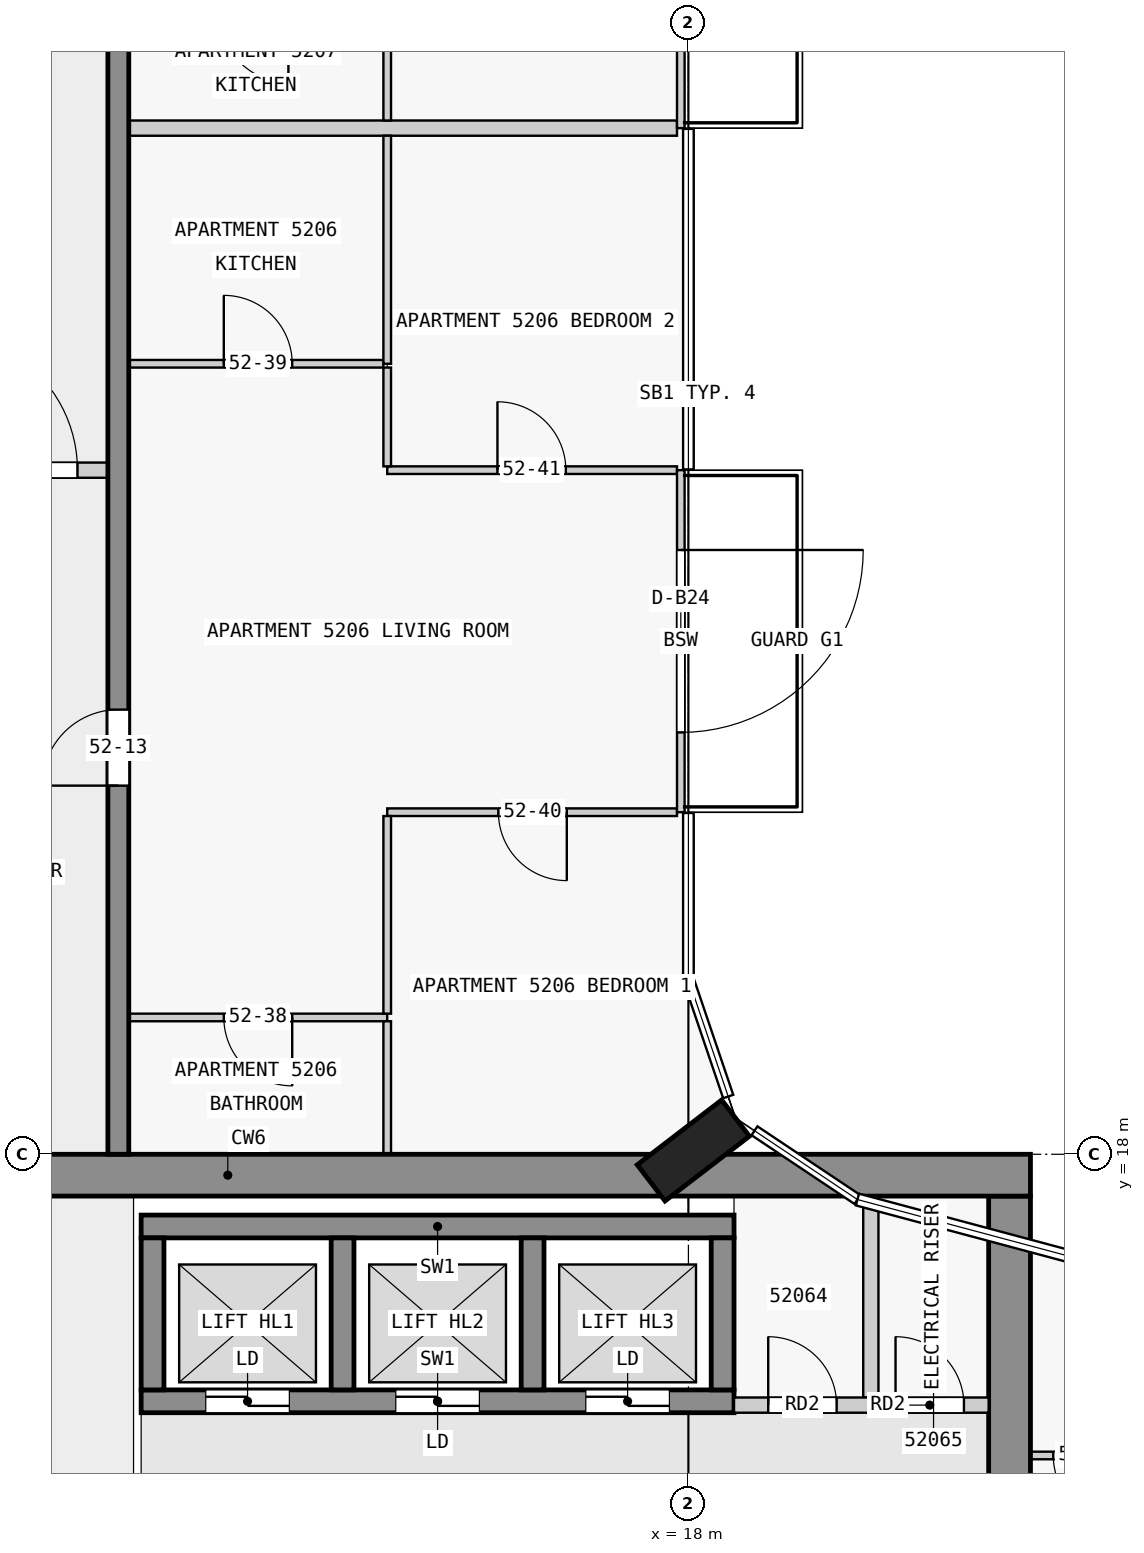
"""IFC4 building model, lengths in metres.
Left out: names, types, materials, properties, quantities, classifications, styles, units other than length and angle.
Written with IfcOpenShell. Run it as: python <this file> out.ifc"""

import sys

from ifc_helpers import new_model, si_unit, direction, frame, frame_2d, origin, origin_2d, place, context, subcontext, project, spatial, rectangle, extrude, element, fill, save


model = new_model("IFC4")
c1 = context("Model", 3, precision=1e-05, world=origin(), true_north=direction((0.0, 1.0)))
c2 = subcontext(c1, "Body", "Model", "MODEL_VIEW")
j1 = project(units=[si_unit("LENGTHUNIT", "METRE"), si_unit("PLANEANGLEUNIT", "RADIAN")], contexts=[c1])
p1 = place(None, origin())
s1 = spatial("IfcSite", under=j1, at=p1, CompositionType="ELEMENT")
p2 = place(p1, origin())
s2 = spatial("IfcBuilding", under=s1, at=p2, CompositionType="ELEMENT")
p3 = place(p2, frame((0.0, 0.0, 201.4)))
s3 = spatial("IfcBuildingStorey", under=s2, at=p3, CompositionType="ELEMENT", Elevation=201.4)
p4 = place(p3, frame((18.065, 18.05, 0.0), z_axis=(0.0, 0.0, 1.0), x_axis=(-0.608810846443, 0.793315418515, 0.0)))
e1 = element("IfcColumn", 1, at=p4, inside=s3, PredefinedType="COLUMN", context=c2, shape_type="SweptSolid", body=[
    extrude(rectangle(XDim=0.6, YDim=1.4, at=origin_2d()), origin(), (0.0, 0.0, 1.0), 3.5),
])
p5 = place(p3, frame((1.38, 17.725, 0.0), z_axis=(0.0, 0.0, 1.0), x_axis=(1.0, 0.0, 0.0)))
e2 = element("IfcWall", 2, at=p5, inside=s3, PredefinedType="SHEAR", context=c2, shape_type="SweptSolid", body=[
    extrude(rectangle(XDim=21.12, YDim=0.55, at=frame_2d((10.56, 0.0))), origin(), (0.0, 0.0, 1.0), 3.25),
])
p6 = place(p5, frame((6.35, 0.0, 0.0)))
e3 = element("IfcOpeningElement", 3, at=p6, cuts=e2, PredefinedType="OPENING", context=c2, shape_type="SweptSolid", body=[
    extrude(rectangle(XDim=1.8, YDim=2.1, at=frame_2d((0.9, 1.05))), frame((0.0, 0.285, 0.0), z_axis=(0.0, -1.0, 0.0), x_axis=(1.0, 0.0, 0.0)), (0.0, 0.0, 1.0), 0.57),
])
p7 = place(p3, frame((22.225, 2.5, 0.0), z_axis=(0.0, 0.0, 1.0), x_axis=(0.0, 1.0, 0.0)))
e4 = element("IfcWall", 4, at=p7, inside=s3, PredefinedType="SHEAR", context=c2, shape_type="SweptSolid", body=[
    extrude(rectangle(XDim=14.95, YDim=0.55, at=frame_2d((7.475, 0.0))), origin(), (0.0, 0.0, 1.0), 3.25),
])
p8 = place(p7, frame((5.6, 0.0, 0.0)))
e5 = element("IfcOpeningElement", 5, at=p8, cuts=e4, PredefinedType="OPENING", context=c2, shape_type="SweptSolid", body=[
    extrude(rectangle(XDim=1.8, YDim=2.1, at=frame_2d((0.9, 1.05))), frame((0.0, 0.285, 0.0), z_axis=(0.0, -1.0, 0.0), x_axis=(1.0, 0.0, 0.0)), (0.0, 0.0, 1.0), 0.57),
])
p9 = place(p3, frame((10.8, 17.05, 0.0), z_axis=(0.0, 0.0, 1.0), x_axis=(1.0, 0.0, 0.0)))
e6 = element("IfcWall", 6, at=p9, inside=s3, PredefinedType="SHEAR", context=c2, shape_type="SweptSolid", body=[
    extrude(rectangle(XDim=7.8, YDim=0.3, at=frame_2d((3.9, 0.0))), origin(), (0.0, 0.0, 1.0), 3.25),
])
p10 = place(p3, frame((10.8, 14.75, 0.0), z_axis=(0.0, 0.0, 1.0), x_axis=(1.0, 0.0, 0.0)))
e7 = element("IfcWall", 7, at=p10, inside=s3, PredefinedType="SHEAR", context=c2, shape_type="SweptSolid", body=[
    extrude(rectangle(XDim=7.8, YDim=0.3, at=frame_2d((3.9, 0.0))), origin(), (0.0, 0.0, 1.0), 3.25),
])
p11 = place(p10, frame((0.85, 0.0, 0.0)))
e8 = element("IfcOpeningElement", 8, at=p11, cuts=e7, PredefinedType="OPENING", context=c2, shape_type="SweptSolid", body=[
    extrude(rectangle(XDim=1.1, YDim=2.1, at=frame_2d((0.55, 1.05))), frame((0.0, 0.16, 0.0), z_axis=(0.0, -1.0, 0.0), x_axis=(1.0, 0.0, 0.0)), (0.0, 0.0, 1.0), 0.32),
])
p12 = place(p10, frame((3.35, 0.0, 0.0)))
e9 = element("IfcOpeningElement", 9, at=p12, cuts=e7, PredefinedType="OPENING", context=c2, shape_type="SweptSolid", body=[
    extrude(rectangle(XDim=1.1, YDim=2.1, at=frame_2d((0.55, 1.05))), frame((0.0, 0.16, 0.0), z_axis=(0.0, -1.0, 0.0), x_axis=(1.0, 0.0, 0.0)), (0.0, 0.0, 1.0), 0.32),
])
p13 = place(p10, frame((5.85, 0.0, 0.0)))
e10 = element("IfcOpeningElement", 10, at=p13, cuts=e7, PredefinedType="OPENING", context=c2, shape_type="SweptSolid", body=[
    extrude(rectangle(XDim=1.1, YDim=2.1, at=frame_2d((0.55, 1.05))), frame((0.0, 0.16, 0.0), z_axis=(0.0, -1.0, 0.0), x_axis=(1.0, 0.0, 0.0)), (0.0, 0.0, 1.0), 0.32),
])
for number, where, z_axis, x_axis in (
    (11, (10.95, 14.9, 0.0), (0.0, 0.0, 1.0), (0.0, 1.0, 0.0)),
    (12, (13.45, 14.9, 0.0), (0.0, 0.0, 1.0), (0.0, 1.0, 0.0)),
    (13, (15.95, 14.9, 0.0), (0.0, 0.0, 1.0), (0.0, 1.0, 0.0)),
    (14, (18.45, 14.9, 0.0), (0.0, 0.0, 1.0), (0.0, 1.0, 0.0)),
):
    element("IfcWall", number, at=place(p3, frame(where, z_axis=z_axis, x_axis=x_axis)), inside=s3, PredefinedType="SHEAR", context=c2, shape_type="SweptSolid", body=[
        extrude(rectangle(XDim=2.0, YDim=0.3, at=frame_2d((1.0, 0.0))), origin(), (0.0, 0.0, 1.0), 3.25),
    ])
p14 = place(p3, frame((10.5, 18.0, 0.0), z_axis=(0.0, 0.0, 1.0), x_axis=(0.0, 1.0, 0.0)))
e15 = element("IfcWall", 15, at=p14, inside=s3, PredefinedType="SHEAR", context=c2, shape_type="SweptSolid", body=[
    extrude(rectangle(XDim=27.0, YDim=0.275, at=frame_2d((13.5, 0.0))), origin(), (0.0, 0.0, 1.0), 3.25),
])
p15 = place(p14, frame((4.85, 0.0, 0.0)))
e16 = element("IfcOpeningElement", 16, at=p15, cuts=e15, PredefinedType="OPENING", context=c2, shape_type="SweptSolid", body=[
    extrude(rectangle(XDim=1.0, YDim=2.1, at=frame_2d((0.5, 1.05))), frame((0.0, 0.147, 0.0), z_axis=(0.0, -1.0, 0.0), x_axis=(1.0, 0.0, 0.0)), (0.0, 0.0, 1.0), 0.295),
])
p16 = place(p14, frame((15.25, 0.0, 0.0)))
e17 = element("IfcOpeningElement", 17, at=p16, cuts=e15, PredefinedType="OPENING", context=c2, shape_type="SweptSolid", body=[
    extrude(rectangle(XDim=1.0, YDim=2.1, at=frame_2d((0.5, 1.05))), frame((0.0, 0.147, 0.0), z_axis=(0.0, -1.0, 0.0), x_axis=(1.0, 0.0, 0.0)), (0.0, 0.0, 1.0), 0.295),
])
p17 = place(p14, frame((21.35, 0.0, 0.0)))
e18 = element("IfcOpeningElement", 18, at=p17, cuts=e15, PredefinedType="OPENING", context=c2, shape_type="SweptSolid", body=[
    extrude(rectangle(XDim=1.0, YDim=2.1, at=frame_2d((0.5, 1.05))), frame((0.0, 0.147, 0.0), z_axis=(0.0, -1.0, 0.0), x_axis=(1.0, 0.0, 0.0)), (0.0, 0.0, 1.0), 0.295),
])
p18 = place(p3, frame((17.9, 27.0, 0.0), z_axis=(0.0, 0.0, 1.0), x_axis=(0.0, -1.0, 0.0)))
e19 = element("IfcWall", 19, at=p18, inside=s3, PredefinedType="STANDARD", context=c2, shape_type="SweptSolid", body=[
    extrude(rectangle(XDim=4.5, YDim=0.1, at=frame_2d((2.25, 0.0))), origin(), (0.0, 0.0, 1.0), 3.25),
])
p19 = place(p18, frame((1.05, 0.0, 0.0)))
e20 = element("IfcOpeningElement", 20, at=p19, cuts=e19, PredefinedType="OPENING", context=c2, shape_type="SweptSolid", body=[
    extrude(rectangle(XDim=2.4, YDim=2.4, at=frame_2d((1.2, 1.2))), frame((0.0, 0.06, 0.0), z_axis=(0.0, -1.0, 0.0), x_axis=(1.0, 0.0, 0.0)), (0.0, 0.0, 1.0), 0.12),
])
p20 = place(p3, frame((17.9, 36.0, 0.0), z_axis=(0.0, 0.0, 1.0), x_axis=(0.0, -1.0, 0.0)))
e21 = element("IfcWall", 21, at=p20, inside=s3, PredefinedType="STANDARD", context=c2, shape_type="SweptSolid", body=[
    extrude(rectangle(XDim=4.5, YDim=0.1, at=frame_2d((2.25, 0.0))), origin(), (0.0, 0.0, 1.0), 3.25),
])
p21 = place(p20, frame((1.05, 0.0, 0.0)))
e22 = element("IfcOpeningElement", 22, at=p21, cuts=e21, PredefinedType="OPENING", context=c2, shape_type="SweptSolid", body=[
    extrude(rectangle(XDim=2.4, YDim=2.4, at=frame_2d((1.2, 1.2))), frame((0.0, 0.06, 0.0), z_axis=(0.0, -1.0, 0.0), x_axis=(1.0, 0.0, 0.0)), (0.0, 0.0, 1.0), 0.12),
])
p22 = place(p3, frame((18.6, 14.7, 0.0), z_axis=(0.0, 0.0, 1.0), x_axis=(1.0, 0.0, 0.0)))
e23 = element("IfcWall", 23, at=p22, inside=s3, PredefinedType="PARTITIONING", context=c2, shape_type="SweptSolid", body=[
    extrude(rectangle(XDim=3.35, YDim=0.2, at=frame_2d((1.675, 0.0))), origin(), (0.0, 0.0, 1.0), 3.25),
])
p23 = place(p22, frame((0.45, 0.0, 0.0)))
e24 = element("IfcOpeningElement", 24, at=p23, cuts=e23, PredefinedType="OPENING", context=c2, shape_type="SweptSolid", body=[
    extrude(rectangle(XDim=0.9, YDim=2.1, at=frame_2d((0.45, 1.05))), frame((0.0, 0.11, 0.0), z_axis=(0.0, -1.0, 0.0), x_axis=(1.0, 0.0, 0.0)), (0.0, 0.0, 1.0), 0.22),
])
p24 = place(p22, frame((2.125, 0.0, 0.0)))
e25 = element("IfcOpeningElement", 25, at=p24, cuts=e23, PredefinedType="OPENING", context=c2, shape_type="SweptSolid", body=[
    extrude(rectangle(XDim=0.9, YDim=2.1, at=frame_2d((0.45, 1.05))), frame((0.0, 0.11, 0.0), z_axis=(0.0, -1.0, 0.0), x_axis=(1.0, 0.0, 0.0)), (0.0, 0.0, 1.0), 0.22),
])
p25 = place(p3, frame((20.4, 14.8, 0.0), z_axis=(0.0, 0.0, 1.0), x_axis=(0.0, 1.0, 0.0)))
e26 = element("IfcWall", 26, at=p25, inside=s3, PredefinedType="PARTITIONING", context=c2, shape_type="SweptSolid", body=[
    extrude(rectangle(XDim=2.65, YDim=0.2, at=frame_2d((1.325, 0.0))), origin(), (0.0, 0.0, 1.0), 3.25),
])
p26 = place(p3, frame((24.05, 14.038, 0.0), z_axis=(0.0, 0.0, 1.0), x_axis=(-1.0, 0.0, 0.0)))
e27 = element("IfcWall", 27, at=p26, inside=s3, PredefinedType="PARTITIONING", context=c2, shape_type="SweptSolid", body=[
    extrude(rectangle(XDim=1.55, YDim=0.1, at=frame_2d((0.775, 0.0))), origin(), (0.0, 0.0, 1.0), 3.25),
])
p27 = place(p26, frame((0.35, 0.0, 0.0)))
e28 = element("IfcOpeningElement", 28, at=p27, cuts=e27, PredefinedType="OPENING", context=c2, shape_type="SweptSolid", body=[
    extrude(rectangle(XDim=0.9, YDim=2.1, at=frame_2d((0.45, 1.05))), frame((0.0, 0.06, 0.0), z_axis=(0.0, -1.0, 0.0), x_axis=(1.0, 0.0, 0.0)), (0.0, 0.0, 1.0), 0.12),
])
p28 = place(p3, frame((14.038, 19.8, 0.0), z_axis=(0.0, 0.0, 1.0), x_axis=(-1.0, 0.0, 0.0)))
e29 = element("IfcWall", 29, at=p28, inside=s3, PredefinedType="PARTITIONING", context=c2, shape_type="SweptSolid", body=[
    extrude(rectangle(XDim=3.4, YDim=0.1, at=frame_2d((1.7, 0.0))), origin(), (0.0, 0.0, 1.0), 3.25),
])
p29 = place(p28, frame((1.25, 0.0, 0.0)))
e30 = element("IfcOpeningElement", 30, at=p29, cuts=e29, PredefinedType="OPENING", context=c2, shape_type="SweptSolid", body=[
    extrude(rectangle(XDim=0.9, YDim=2.1, at=frame_2d((0.45, 1.05))), frame((0.0, 0.06, 0.0), z_axis=(0.0, -1.0, 0.0), x_axis=(1.0, 0.0, 0.0)), (0.0, 0.0, 1.0), 0.12),
])
p30 = place(p3, frame((17.85, 22.5, 0.0), z_axis=(0.0, 0.0, 1.0), x_axis=(-1.0, 0.0, 0.0)))
e31 = element("IfcWall", 31, at=p30, inside=s3, PredefinedType="PARTITIONING", context=c2, shape_type="SweptSolid", body=[
    extrude(rectangle(XDim=3.812, YDim=0.1, at=frame_2d((1.906, 0.0))), origin(), (0.0, 0.0, 1.0), 3.25),
])
p31 = place(p30, frame((1.45, 0.0, 0.0)))
e32 = element("IfcOpeningElement", 32, at=p31, cuts=e31, PredefinedType="OPENING", context=c2, shape_type="SweptSolid", body=[
    extrude(rectangle(XDim=0.9, YDim=2.1, at=frame_2d((0.45, 1.05))), frame((0.0, 0.06, 0.0), z_axis=(0.0, -1.0, 0.0), x_axis=(1.0, 0.0, 0.0)), (0.0, 0.0, 1.0), 0.12),
])
p32 = place(p3, frame((14.038, 27.0, 0.0), z_axis=(0.0, 0.0, 1.0), x_axis=(1.0, 0.0, 0.0)))
e33 = element("IfcWall", 33, at=p32, inside=s3, PredefinedType="PARTITIONING", context=c2, shape_type="SweptSolid", body=[
    extrude(rectangle(XDim=3.812, YDim=0.1, at=frame_2d((1.906, 0.0))), origin(), (0.0, 0.0, 1.0), 3.25),
])
p33 = place(p32, frame((1.45, 0.0, 0.0)))
e34 = element("IfcOpeningElement", 34, at=p33, cuts=e33, PredefinedType="OPENING", context=c2, shape_type="SweptSolid", body=[
    extrude(rectangle(XDim=0.9, YDim=2.1, at=frame_2d((0.45, 1.05))), frame((0.0, 0.06, 0.0), z_axis=(0.0, -1.0, 0.0), x_axis=(1.0, 0.0, 0.0)), (0.0, 0.0, 1.0), 0.12),
])
p34 = place(p3, frame((10.637, 28.4, 0.0), z_axis=(0.0, 0.0, 1.0), x_axis=(1.0, 0.0, 0.0)))
e35 = element("IfcWall", 35, at=p34, inside=s3, PredefinedType="PARTITIONING", context=c2, shape_type="SweptSolid", body=[
    extrude(rectangle(XDim=3.35, YDim=0.1, at=frame_2d((1.675, 0.0))), origin(), (0.0, 0.0, 1.0), 3.25),
])
p35 = place(p34, frame((1.25, 0.0, 0.0)))
e36 = element("IfcOpeningElement", 36, at=p35, cuts=e35, PredefinedType="OPENING", context=c2, shape_type="SweptSolid", body=[
    extrude(rectangle(XDim=0.9, YDim=2.1, at=frame_2d((0.45, 1.05))), frame((0.0, 0.06, 0.0), z_axis=(0.0, -1.0, 0.0), x_axis=(1.0, 0.0, 0.0)), (0.0, 0.0, 1.0), 0.12),
])
p36 = place(p3, frame((17.85, 31.5, 0.0), z_axis=(0.0, 0.0, 1.0), x_axis=(-1.0, 0.0, 0.0)))
e37 = element("IfcWall", 37, at=p36, inside=s3, PredefinedType="PARTITIONING", context=c2, shape_type="SweptSolid", body=[
    extrude(rectangle(XDim=7.213, YDim=0.2, at=frame_2d((3.606, 0.0))), origin(), (0.0, 0.0, 1.0), 3.25),
])
p37 = place(p3, frame((14.038, 22.45, 0.0), z_axis=(0.0, 0.0, 1.0), x_axis=(0.0, -1.0, 0.0)))
e38 = element("IfcWall", 38, at=p37, inside=s3, PredefinedType="PARTITIONING", context=c2, shape_type="SweptSolid", body=[
    extrude(rectangle(XDim=2.6, YDim=0.1, at=frame_2d((1.3, 0.0))), origin(), (0.0, 0.0, 1.0), 3.25),
])
p38 = place(p3, frame((14.038, 28.35, 0.0), z_axis=(0.0, 0.0, 1.0), x_axis=(0.0, -1.0, 0.0)))
e39 = element("IfcWall", 39, at=p38, inside=s3, PredefinedType="PARTITIONING", context=c2, shape_type="SweptSolid", body=[
    extrude(rectangle(XDim=1.3, YDim=0.1, at=frame_2d((0.65, 0.0))), origin(), (0.0, 0.0, 1.0), 3.25),
])
p39 = place(p3, frame((14.038, 18.0, 0.0), z_axis=(0.0, 0.0, 1.0), x_axis=(0.0, 1.0, 0.0)))
e40 = element("IfcWall", 40, at=p39, inside=s3, PredefinedType="PARTITIONING", context=c2, shape_type="SweptSolid", body=[
    extrude(rectangle(XDim=1.75, YDim=0.1, at=frame_2d((0.875, 0.0))), origin(), (0.0, 0.0, 1.0), 3.25),
])
p40 = place(p3, frame((14.038, 28.4, 0.0), z_axis=(0.0, 0.0, 1.0), x_axis=(0.0, 1.0, 0.0)))
e41 = element("IfcWall", 41, at=p40, inside=s3, PredefinedType="PARTITIONING", context=c2, shape_type="SweptSolid", body=[
    extrude(rectangle(XDim=3.0, YDim=0.1, at=frame_2d((1.5, 0.0))), origin(), (0.0, 0.0, 1.0), 3.25),
])
p41 = place(p3, frame((14.038, 31.6, 0.0), z_axis=(0.0, 0.0, 1.0), x_axis=(0.0, 1.0, 0.0)))
e42 = element("IfcWall", 42, at=p41, inside=s3, PredefinedType="PARTITIONING", context=c2, shape_type="SweptSolid", body=[
    extrude(rectangle(XDim=1.4, YDim=0.1, at=frame_2d((0.7, 0.0))), origin(), (0.0, 0.0, 1.0), 3.25),
])
p42 = place(p3, frame((7.462, 27.0, 0.0), z_axis=(0.0, 0.0, 1.0), x_axis=(1.0, 0.0, 0.0)))
e43 = element("IfcWall", 43, at=p42, inside=s3, PredefinedType="PARTITIONING", context=c2, shape_type="SweptSolid", body=[
    extrude(rectangle(XDim=3.175, YDim=0.2, at=frame_2d((1.587, 0.0))), origin(), (0.0, 0.0, 1.0), 3.25),
])
p43 = place(p42, frame((0.7, 0.0, 0.0)))
e44 = element("IfcOpeningElement", 44, at=p43, cuts=e43, PredefinedType="OPENING", context=c2, shape_type="SweptSolid", body=[
    extrude(rectangle(XDim=1.8, YDim=2.1, at=frame_2d((0.9, 1.05))), frame((0.0, 0.11, 0.0), z_axis=(0.0, -1.0, 0.0), x_axis=(1.0, 0.0, 0.0)), (0.0, 0.0, 1.0), 0.22),
])
p44 = place(p19, origin())
e45 = element("IfcDoor", 45, at=p44, inside=s3, OperationType="SINGLE_SWING_LEFT", PredefinedType="DOOR", context=c2, shape_type="SweptSolid", body=[
    extrude(rectangle(XDim=2.4, YDim=2.4, at=frame_2d((1.2, 1.2))), frame((0.0, 0.025, 0.0), z_axis=(0.0, -1.0, 0.0), x_axis=(1.0, 0.0, 0.0)), (0.0, 0.0, 1.0), 0.05),
])
fill(e20, e45)
p45 = place(p11, origin())
e46 = element("IfcDoor", 46, at=p45, inside=s3, OperationType="DOUBLE_DOOR_SLIDING", PredefinedType="DOOR", context=c2, shape_type="SweptSolid", body=[
    extrude(rectangle(XDim=1.1, YDim=2.1, at=frame_2d((0.55, 1.05))), frame((0.0, 0.025, 0.0), z_axis=(0.0, -1.0, 0.0), x_axis=(1.0, 0.0, 0.0)), (0.0, 0.0, 1.0), 0.05),
])
fill(e8, e46)
p46 = place(p12, origin())
e47 = element("IfcDoor", 47, at=p46, inside=s3, OperationType="DOUBLE_DOOR_SLIDING", PredefinedType="DOOR", context=c2, shape_type="SweptSolid", body=[
    extrude(rectangle(XDim=1.1, YDim=2.1, at=frame_2d((0.55, 1.05))), frame((0.0, 0.025, 0.0), z_axis=(0.0, -1.0, 0.0), x_axis=(1.0, 0.0, 0.0)), (0.0, 0.0, 1.0), 0.05),
])
fill(e9, e47)
p47 = place(p13, origin())
e48 = element("IfcDoor", 48, at=p47, inside=s3, OperationType="DOUBLE_DOOR_SLIDING", PredefinedType="DOOR", context=c2, shape_type="SweptSolid", body=[
    extrude(rectangle(XDim=1.1, YDim=2.1, at=frame_2d((0.55, 1.05))), frame((0.0, 0.025, 0.0), z_axis=(0.0, -1.0, 0.0), x_axis=(1.0, 0.0, 0.0)), (0.0, 0.0, 1.0), 0.05),
])
fill(e10, e48)
p48 = place(p23, origin())
e49 = element("IfcDoor", 49, at=p48, inside=s3, OperationType="SINGLE_SWING_LEFT", PredefinedType="DOOR", context=c2, shape_type="SweptSolid", body=[
    extrude(rectangle(XDim=0.9, YDim=2.1, at=frame_2d((0.45, 1.05))), frame((0.0, 0.025, 0.0), z_axis=(0.0, -1.0, 0.0), x_axis=(1.0, 0.0, 0.0)), (0.0, 0.0, 1.0), 0.05),
])
fill(e24, e49)
p49 = place(p24, origin())
e50 = element("IfcDoor", 50, at=p49, inside=s3, OperationType="SINGLE_SWING_LEFT", PredefinedType="DOOR", context=c2, shape_type="SweptSolid", body=[
    extrude(rectangle(XDim=0.9, YDim=2.1, at=frame_2d((0.45, 1.05))), frame((0.0, 0.025, 0.0), z_axis=(0.0, -1.0, 0.0), x_axis=(1.0, 0.0, 0.0)), (0.0, 0.0, 1.0), 0.05),
])
fill(e25, e50)
p50 = place(p15, origin())
e51 = element("IfcDoor", 51, at=p50, inside=s3, OperationType="SINGLE_SWING_LEFT", PredefinedType="DOOR", context=c2, shape_type="SweptSolid", body=[
    extrude(rectangle(XDim=1.0, YDim=2.1, at=frame_2d((0.5, 1.05))), frame((0.0, 0.025, 0.0), z_axis=(0.0, -1.0, 0.0), x_axis=(1.0, 0.0, 0.0)), (0.0, 0.0, 1.0), 0.05),
])
fill(e16, e51)
p51 = place(p43, origin())
e52 = element("IfcDoor", 52, at=p51, inside=s3, OperationType="SINGLE_SWING_RIGHT", PredefinedType="DOOR", context=c2, shape_type="SweptSolid", body=[
    extrude(rectangle(XDim=1.8, YDim=2.1, at=frame_2d((0.9, 1.05))), frame((0.0, 0.025, 0.0), z_axis=(0.0, -1.0, 0.0), x_axis=(1.0, 0.0, 0.0)), (0.0, 0.0, 1.0), 0.05),
])
fill(e44, e52)
p52 = place(p27, origin())
e53 = element("IfcDoor", 53, at=p52, inside=s3, OperationType="SINGLE_SWING_RIGHT", PredefinedType="DOOR", context=c2, shape_type="SweptSolid", body=[
    extrude(rectangle(XDim=0.9, YDim=2.1, at=frame_2d((0.45, 1.05))), frame((0.0, 0.025, 0.0), z_axis=(0.0, -1.0, 0.0), x_axis=(1.0, 0.0, 0.0)), (0.0, 0.0, 1.0), 0.05),
])
fill(e28, e53)
p53 = place(p29, origin())
e54 = element("IfcDoor", 54, at=p53, inside=s3, OperationType="SINGLE_SWING_LEFT", PredefinedType="DOOR", context=c2, shape_type="SweptSolid", body=[
    extrude(rectangle(XDim=0.9, YDim=2.1, at=frame_2d((0.45, 1.05))), frame((0.0, 0.025, 0.0), z_axis=(0.0, -1.0, 0.0), x_axis=(1.0, 0.0, 0.0)), (0.0, 0.0, 1.0), 0.05),
])
fill(e30, e54)
p54 = place(p35, origin())
e55 = element("IfcDoor", 55, at=p54, inside=s3, OperationType="SINGLE_SWING_RIGHT", PredefinedType="DOOR", context=c2, shape_type="SweptSolid", body=[
    extrude(rectangle(XDim=0.9, YDim=2.1, at=frame_2d((0.45, 1.05))), frame((0.0, 0.025, 0.0), z_axis=(0.0, -1.0, 0.0), x_axis=(1.0, 0.0, 0.0)), (0.0, 0.0, 1.0), 0.05),
])
fill(e36, e55)
p55 = place(p31, origin())
e56 = element("IfcDoor", 56, at=p55, inside=s3, OperationType="SINGLE_SWING_LEFT", PredefinedType="DOOR", context=c2, shape_type="SweptSolid", body=[
    extrude(rectangle(XDim=0.9, YDim=2.1, at=frame_2d((0.45, 1.05))), frame((0.0, 0.025, 0.0), z_axis=(0.0, -1.0, 0.0), x_axis=(1.0, 0.0, 0.0)), (0.0, 0.0, 1.0), 0.05),
])
fill(e32, e56)
p56 = place(p33, origin())
e57 = element("IfcDoor", 57, at=p56, inside=s3, OperationType="SINGLE_SWING_LEFT", PredefinedType="DOOR", context=c2, shape_type="SweptSolid", body=[
    extrude(rectangle(XDim=0.9, YDim=2.1, at=frame_2d((0.45, 1.05))), frame((0.0, 0.025, 0.0), z_axis=(0.0, -1.0, 0.0), x_axis=(1.0, 0.0, 0.0)), (0.0, 0.0, 1.0), 0.05),
])
fill(e34, e57)
save(model, sys.argv[1])
